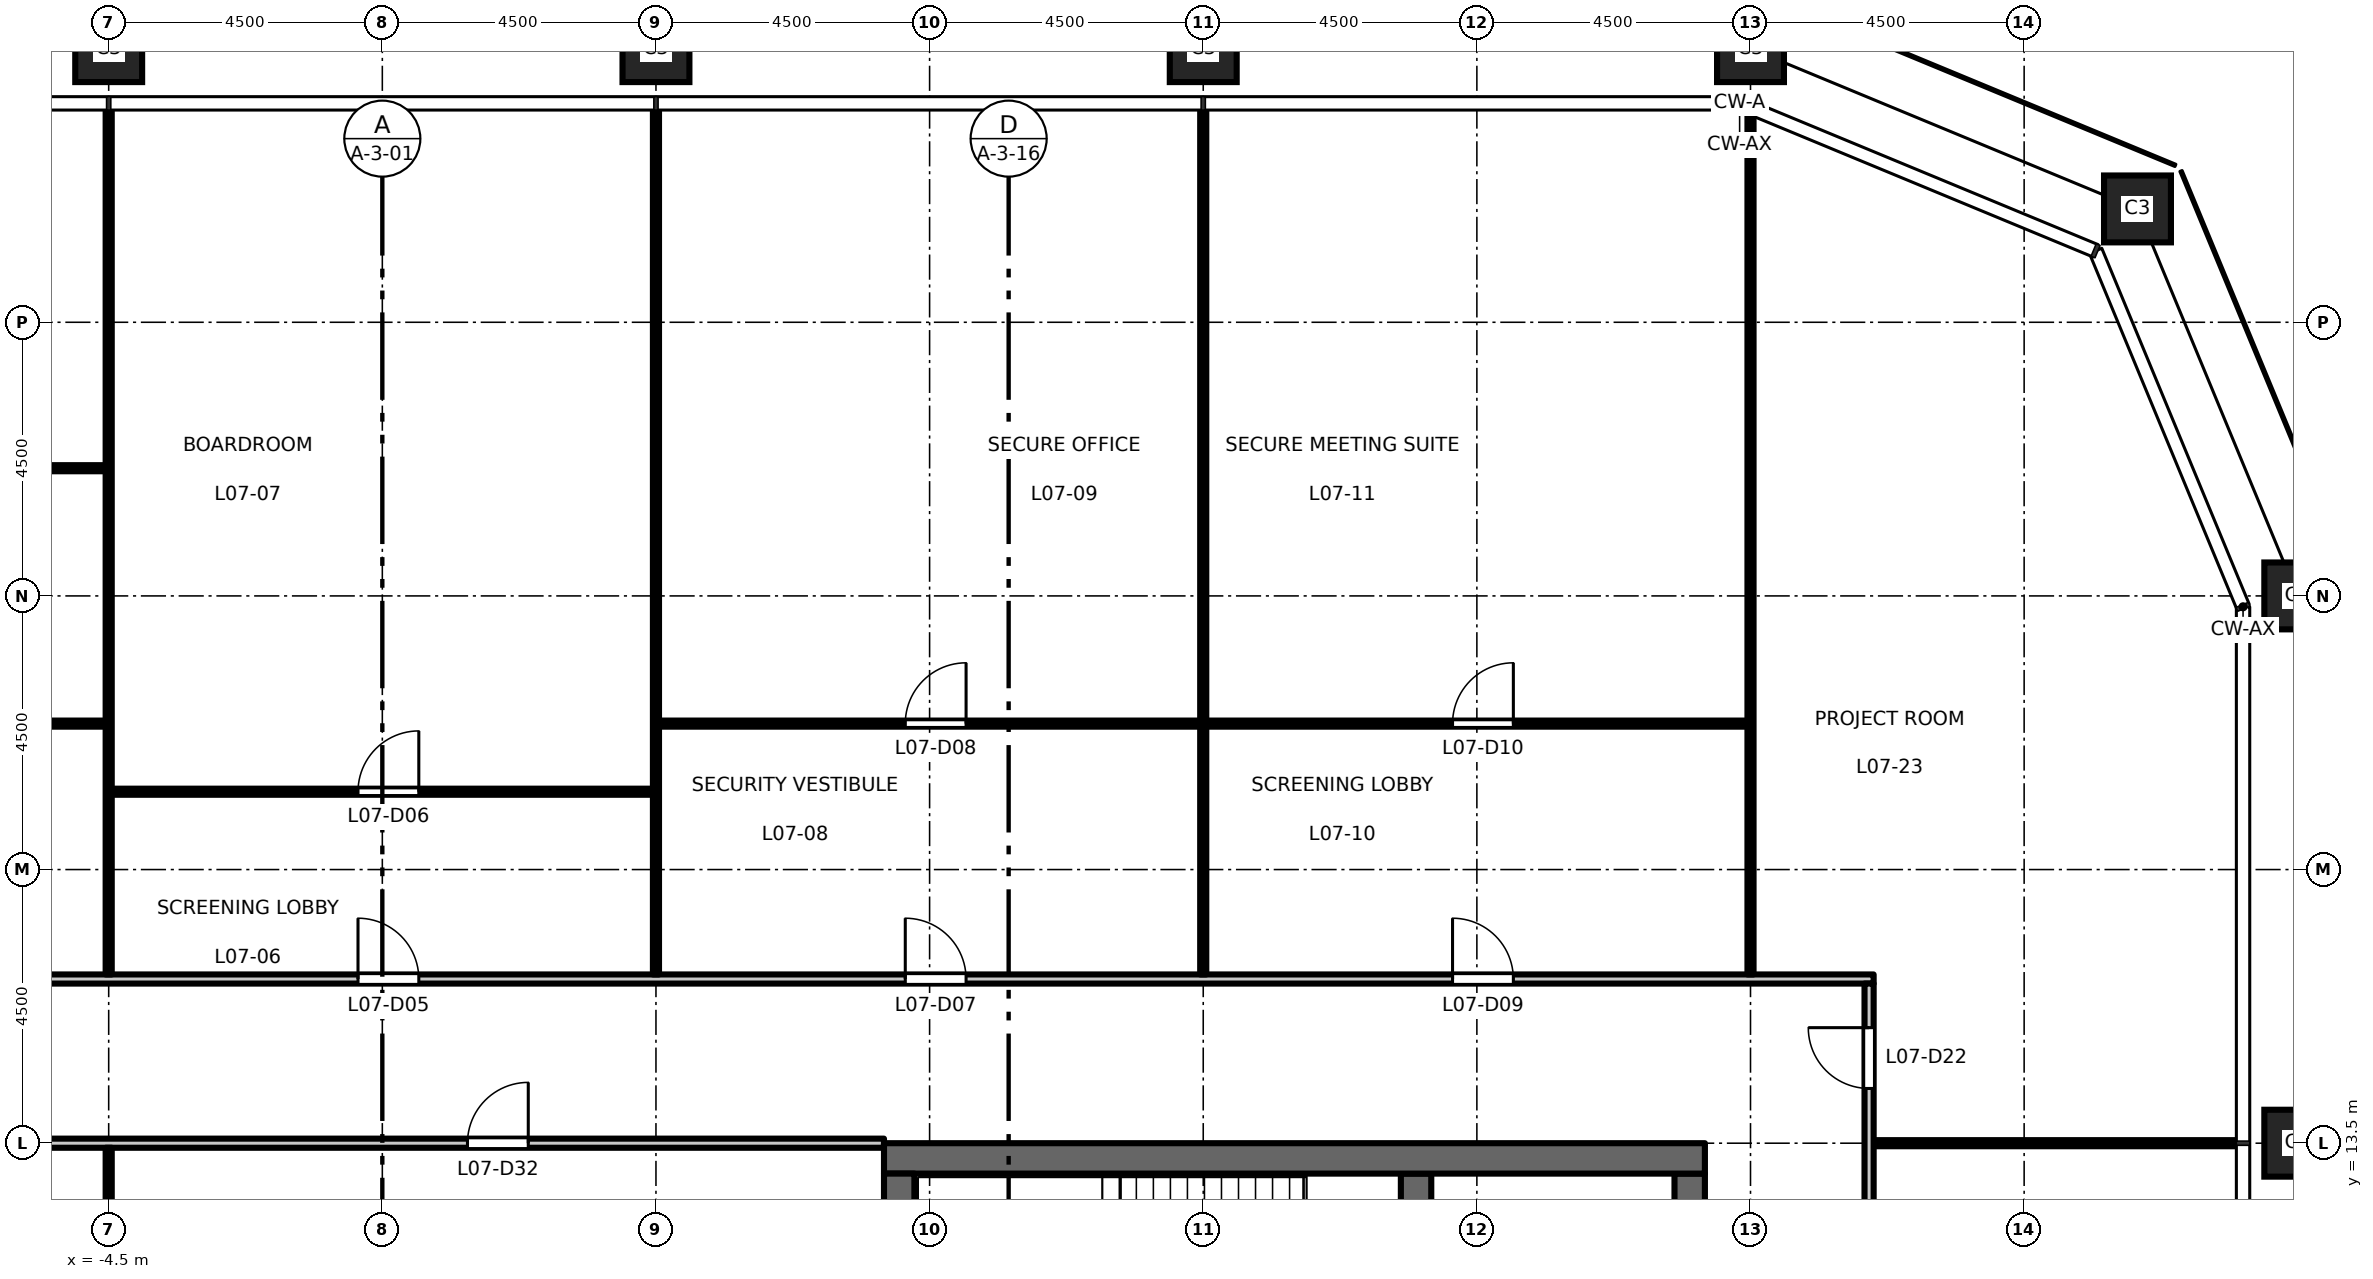
"""IFC4 building model, lengths in metres.
Left out: names, types, materials, properties, quantities, classifications, styles, units other than length and angle.
Written with IfcOpenShell. Run it as: python <this file> out.ifc"""

import sys

from ifc_helpers import new_model, si_unit, direction, frame, frame_2d, origin, origin_2d, place, context, subcontext, project, spatial, rectangle, hollow_rectangle, extrude, element, fill, save


model = new_model("IFC4")
c1 = context("Model", 3, precision=1e-05, world=origin(), true_north=direction((0.0, 1.0)))
c2 = subcontext(c1, "Body", "Model", "MODEL_VIEW")
j1 = project(units=[si_unit("LENGTHUNIT", "METRE"), si_unit("PLANEANGLEUNIT", "RADIAN")], contexts=[c1])
p1 = place(None, origin())
s1 = spatial("IfcSite", under=j1, at=p1, CompositionType="ELEMENT")
p2 = place(p1, origin())
s2 = spatial("IfcBuilding", under=s1, at=p2, CompositionType="ELEMENT")
p3 = place(p2, frame((0.0, 0.0, 35.7)))
s3 = spatial("IfcBuildingStorey", under=s2, at=p3, CompositionType="ELEMENT", Elevation=35.7)
for number, where, z_axis, x_axis in (
    (1, (31.5, 13.5, 0.0), (0.0, 0.0, 1.0), (1.0, 0.0, 0.0)),
    (2, (31.5, 22.5, 0.0), (0.0, 0.0, 1.0), (1.0, 0.0, 0.0)),
    (3, (28.864, 28.864, 0.0), (0.0, 0.0, 1.0), (1.0, 0.0, 0.0)),
    (4, (22.5, 31.5, 0.0), (0.0, 0.0, 1.0), (1.0, 0.0, 0.0)),
    (5, (13.5, 31.5, 0.0), (0.0, 0.0, 1.0), (1.0, 0.0, 0.0)),
    (6, (4.5, 31.5, 0.0), (0.0, 0.0, 1.0), (1.0, 0.0, 0.0)),
    (7, (-4.5, 31.5, 0.0), (0.0, 0.0, 1.0), (1.0, 0.0, 0.0)),
):
    element("IfcColumn", number, at=place(p3, frame(where, z_axis=z_axis, x_axis=x_axis)), inside=s3, PredefinedType="COLUMN", context=c2, shape_type="SweptSolid", body=[
        extrude(hollow_rectangle(XDim=1.1, YDim=1.1, WallThickness=0.07, at=origin_2d()), origin(), (0.0, 0.0, 1.0), 4.5),
    ])
p4 = place(p3, frame((21.5, -13.0, 0.0), z_axis=(0.0, 0.0, 1.0), x_axis=(0.0, 1.0, 0.0)))
e8 = element("IfcWall", 8, at=p4, inside=s3, PredefinedType="SHEAR", context=c2, shape_type="SweptSolid", body=[
    extrude(rectangle(XDim=26.0, YDim=0.5, at=frame_2d((13.0, 0.0))), origin(), (0.0, 0.0, 1.0), 4.35),
])
p5 = place(p4, frame((16.825, 0.0, 0.0)))
e9 = element("IfcOpeningElement", 9, at=p5, cuts=e8, PredefinedType="OPENING", context=c2, shape_type="SweptSolid", body=[
    extrude(rectangle(XDim=1.8, YDim=2.1, at=frame_2d((0.9, 1.05))), frame((0.0, 0.26, 0.0), z_axis=(0.0, -1.0, 0.0), x_axis=(1.0, 0.0, 0.0)), (0.0, 0.0, 1.0), 0.52),
])
p6 = place(p4, frame((7.375, 0.0, 0.0)))
e10 = element("IfcOpeningElement", 10, at=p6, cuts=e8, PredefinedType="OPENING", context=c2, shape_type="SweptSolid", body=[
    extrude(rectangle(XDim=1.8, YDim=2.1, at=frame_2d((0.9, 1.05))), frame((0.0, 0.26, 0.0), z_axis=(0.0, -1.0, 0.0), x_axis=(1.0, 0.0, 0.0)), (0.0, 0.0, 1.0), 0.52),
])
p7 = place(p4, frame((23.4, 0.0, 0.0)))
e11 = element("IfcOpeningElement", 11, at=p7, cuts=e8, PredefinedType="OPENING", context=c2, shape_type="SweptSolid", body=[
    extrude(rectangle(XDim=0.9, YDim=2.1, at=frame_2d((0.45, 1.05))), frame((0.0, 0.26, 0.0), z_axis=(0.0, -1.0, 0.0), x_axis=(1.0, 0.0, 0.0)), (0.0, 0.0, 1.0), 0.52),
])
p8 = place(p3, frame((17.0, 6.425, 0.0), z_axis=(0.0, 0.0, 1.0), x_axis=(0.0, 1.0, 0.0)))
e12 = element("IfcWall", 12, at=p8, inside=s3, PredefinedType="SHEAR", context=c2, shape_type="SweptSolid", body=[
    extrude(rectangle(XDim=6.575, YDim=0.5, at=frame_2d((3.288, 0.0))), origin(), (0.0, 0.0, 1.0), 4.35),
])
p9 = place(p3, frame((8.25, 13.25, 0.0), z_axis=(0.0, 0.0, 1.0), x_axis=(1.0, 0.0, 0.0)))
e13 = element("IfcWall", 13, at=p9, inside=s3, PredefinedType="SHEAR", context=c2, shape_type="SweptSolid", body=[
    extrude(rectangle(XDim=13.5, YDim=0.5, at=frame_2d((6.75, 0.0))), origin(), (0.0, 0.0, 1.0), 4.35),
])
p10 = place(p3, frame((8.5, -13.0, 0.0), z_axis=(0.0, 0.0, 1.0), x_axis=(0.0, 1.0, 0.0)))
e14 = element("IfcWall", 14, at=p10, inside=s3, PredefinedType="SHEAR", context=c2, shape_type="SweptSolid", body=[
    extrude(rectangle(XDim=26.0, YDim=0.5, at=frame_2d((13.0, 0.0))), origin(), (0.0, 0.0, 1.0), 4.35),
])
p11 = place(p3, frame((24.525, 13.5, 0.0), z_axis=(0.0, 0.0, 1.0), x_axis=(1.0, 0.0, 0.0)))
e15 = element("IfcWall", 15, at=p11, inside=s3, PredefinedType="PARTITIONING", context=c2, shape_type="SweptSolid", body=[
    extrude(rectangle(XDim=5.985, YDim=0.1, at=frame_2d((2.993, 0.0))), origin(), (0.0, 0.0, 1.0), 3.35),
])
p12 = place(p3, frame((-8.25, 13.5, 0.0), z_axis=(0.0, 0.0, 1.0), x_axis=(1.0, 0.0, 0.0)))
e16 = element("IfcWall", 16, at=p12, inside=s3, PredefinedType="PARTITIONING", context=c2, shape_type="SweptSolid", body=[
    extrude(rectangle(XDim=16.5, YDim=0.15, at=frame_2d((8.25, 0.0))), origin(), (0.0, 0.0, 1.0), 3.85),
])
p13 = place(p12, frame((1.4, 0.0, 0.0)))
e17 = element("IfcOpeningElement", 17, at=p13, cuts=e16, PredefinedType="OPENING", context=c2, shape_type="SweptSolid", body=[
    extrude(rectangle(XDim=1.0, YDim=2.1, at=frame_2d((0.5, 1.05))), frame((0.0, 0.085, 0.0), z_axis=(0.0, -1.0, 0.0), x_axis=(1.0, 0.0, 0.0)), (0.0, 0.0, 1.0), 0.17),
])
p14 = place(p12, frame((9.65, 0.0, 0.0)))
e18 = element("IfcOpeningElement", 18, at=p14, cuts=e16, PredefinedType="OPENING", context=c2, shape_type="SweptSolid", body=[
    extrude(rectangle(XDim=1.0, YDim=2.1, at=frame_2d((0.5, 1.05))), frame((0.0, 0.085, 0.0), z_axis=(0.0, -1.0, 0.0), x_axis=(1.0, 0.0, 0.0)), (0.0, 0.0, 1.0), 0.17),
])
p15 = place(p3, frame((-24.525, 16.2, 0.0), z_axis=(0.0, 0.0, 1.0), x_axis=(1.0, 0.0, 0.0)))
e19 = element("IfcWall", 19, at=p15, inside=s3, PredefinedType="PARTITIONING", context=c2, shape_type="SweptSolid", body=[
    extrude(rectangle(XDim=49.05, YDim=0.15, at=frame_2d((24.525, 0.0))), origin(), (0.0, 0.0, 1.0), 4.35),
])
p16 = place(p15, frame((6.125, 0.0, 0.0)))
e20 = element("IfcOpeningElement", 20, at=p16, cuts=e19, PredefinedType="OPENING", context=c2, shape_type="SweptSolid", body=[
    extrude(rectangle(XDim=1.0, YDim=2.1, at=frame_2d((0.5, 1.05))), frame((0.0, 0.085, 0.0), z_axis=(0.0, -1.0, 0.0), x_axis=(1.0, 0.0, 0.0)), (0.0, 0.0, 1.0), 0.17),
])
p17 = place(p15, frame((15.125, 0.0, 0.0)))
e21 = element("IfcOpeningElement", 21, at=p17, cuts=e19, PredefinedType="OPENING", context=c2, shape_type="SweptSolid", body=[
    extrude(rectangle(XDim=1.0, YDim=2.1, at=frame_2d((0.5, 1.05))), frame((0.0, 0.085, 0.0), z_axis=(0.0, -1.0, 0.0), x_axis=(1.0, 0.0, 0.0)), (0.0, 0.0, 1.0), 0.17),
])
p18 = place(p15, frame((24.125, 0.0, 0.0)))
e22 = element("IfcOpeningElement", 22, at=p18, cuts=e19, PredefinedType="OPENING", context=c2, shape_type="SweptSolid", body=[
    extrude(rectangle(XDim=1.0, YDim=2.1, at=frame_2d((0.5, 1.05))), frame((0.0, 0.085, 0.0), z_axis=(0.0, -1.0, 0.0), x_axis=(1.0, 0.0, 0.0)), (0.0, 0.0, 1.0), 0.17),
])
p19 = place(p15, frame((33.125, 0.0, 0.0)))
e23 = element("IfcOpeningElement", 23, at=p19, cuts=e19, PredefinedType="OPENING", context=c2, shape_type="SweptSolid", body=[
    extrude(rectangle(XDim=1.0, YDim=2.1, at=frame_2d((0.5, 1.05))), frame((0.0, 0.085, 0.0), z_axis=(0.0, -1.0, 0.0), x_axis=(1.0, 0.0, 0.0)), (0.0, 0.0, 1.0), 0.17),
])
p20 = place(p15, frame((42.125, 0.0, 0.0)))
e24 = element("IfcOpeningElement", 24, at=p20, cuts=e19, PredefinedType="OPENING", context=c2, shape_type="SweptSolid", body=[
    extrude(rectangle(XDim=1.0, YDim=2.1, at=frame_2d((0.5, 1.05))), frame((0.0, 0.085, 0.0), z_axis=(0.0, -1.0, 0.0), x_axis=(1.0, 0.0, 0.0)), (0.0, 0.0, 1.0), 0.17),
])
p21 = place(p3, frame((-4.45, 19.28, 0.0), z_axis=(0.0, 0.0, 1.0), x_axis=(1.0, 0.0, 0.0)))
e25 = element("IfcWall", 25, at=p21, inside=s3, PredefinedType="PARTITIONING", context=c2, shape_type="SweptSolid", body=[
    extrude(rectangle(XDim=8.9, YDim=0.1, at=frame_2d((4.45, 0.0))), origin(), (0.0, 0.0, 1.0), 4.35),
])
p22 = place(p21, frame((4.05, 0.0, 0.0)))
e26 = element("IfcOpeningElement", 26, at=p22, cuts=e25, PredefinedType="OPENING", context=c2, shape_type="SweptSolid", body=[
    extrude(rectangle(XDim=1.0, YDim=2.1, at=frame_2d((0.5, 1.05))), frame((0.0, 0.06, 0.0), z_axis=(0.0, -1.0, 0.0), x_axis=(1.0, 0.0, 0.0)), (0.0, 0.0, 1.0), 0.12),
])
p23 = place(p3, frame((-13.45, 20.4, 0.0), z_axis=(0.0, 0.0, 1.0), x_axis=(1.0, 0.0, 0.0)))
e27 = element("IfcWall", 27, at=p23, inside=s3, PredefinedType="PARTITIONING", context=c2, shape_type="SweptSolid", body=[
    extrude(rectangle(XDim=8.9, YDim=0.1, at=frame_2d((4.45, 0.0))), origin(), (0.0, 0.0, 1.0), 4.35),
])
p24 = place(p23, frame((4.05, 0.0, 0.0)))
e28 = element("IfcOpeningElement", 28, at=p24, cuts=e27, PredefinedType="OPENING", context=c2, shape_type="SweptSolid", body=[
    extrude(rectangle(XDim=1.0, YDim=2.1, at=frame_2d((0.5, 1.05))), frame((0.0, 0.06, 0.0), z_axis=(0.0, -1.0, 0.0), x_axis=(1.0, 0.0, 0.0)), (0.0, 0.0, 1.0), 0.12),
])
p25 = place(p3, frame((4.55, 20.4, 0.0), z_axis=(0.0, 0.0, 1.0), x_axis=(1.0, 0.0, 0.0)))
e29 = element("IfcWall", 29, at=p25, inside=s3, PredefinedType="PARTITIONING", context=c2, shape_type="SweptSolid", body=[
    extrude(rectangle(XDim=17.9, YDim=0.1, at=frame_2d((8.95, 0.0))), origin(), (0.0, 0.0, 1.0), 4.35),
])
p26 = place(p25, frame((4.05, 0.0, 0.0)))
e30 = element("IfcOpeningElement", 30, at=p26, cuts=e29, PredefinedType="OPENING", context=c2, shape_type="SweptSolid", body=[
    extrude(rectangle(XDim=1.0, YDim=2.1, at=frame_2d((0.5, 1.05))), frame((0.0, 0.06, 0.0), z_axis=(0.0, -1.0, 0.0), x_axis=(1.0, 0.0, 0.0)), (0.0, 0.0, 1.0), 0.12),
])
p27 = place(p25, frame((13.05, 0.0, 0.0)))
e31 = element("IfcOpeningElement", 31, at=p27, cuts=e29, PredefinedType="OPENING", context=c2, shape_type="SweptSolid", body=[
    extrude(rectangle(XDim=1.0, YDim=2.1, at=frame_2d((0.5, 1.05))), frame((0.0, 0.06, 0.0), z_axis=(0.0, -1.0, 0.0), x_axis=(1.0, 0.0, 0.0)), (0.0, 0.0, 1.0), 0.12),
])
p28 = place(p3, frame((-13.45, 24.6, 0.0), z_axis=(0.0, 0.0, 1.0), x_axis=(1.0, 0.0, 0.0)))
e32 = element("IfcWall", 32, at=p28, inside=s3, PredefinedType="PARTITIONING", context=c2, shape_type="SweptSolid", body=[
    extrude(rectangle(XDim=8.9, YDim=0.1, at=frame_2d((4.45, 0.0))), origin(), (0.0, 0.0, 1.0), 4.35),
])
p29 = place(p28, frame((4.05, 0.0, 0.0)))
e33 = element("IfcOpeningElement", 33, at=p29, cuts=e32, PredefinedType="OPENING", context=c2, shape_type="SweptSolid", body=[
    extrude(rectangle(XDim=1.0, YDim=2.1, at=frame_2d((0.5, 1.05))), frame((0.0, 0.06, 0.0), z_axis=(0.0, -1.0, 0.0), x_axis=(1.0, 0.0, 0.0)), (0.0, 0.0, 1.0), 0.12),
])
p30 = place(p3, frame((-4.5, 8.37, 0.0), z_axis=(0.0, 0.0, 1.0), x_axis=(0.0, 1.0, 0.0)))
e34 = element("IfcWall", 34, at=p30, inside=s3, PredefinedType="PARTITIONING", context=c2, shape_type="SweptSolid", body=[
    extrude(rectangle(XDim=5.055, YDim=0.1, at=frame_2d((2.527, 0.0))), origin(), (0.0, 0.0, 1.0), 3.35),
])
for number, where, z_axis, x_axis in (
    (35, (-4.5, 16.275, 0.0), (0.0, 0.0, 1.0), (0.0, 1.0, 0.0)),
    (36, (4.5, 16.275, 0.0), (0.0, 0.0, 1.0), (0.0, 1.0, 0.0)),
):
    element("IfcWall", number, at=place(p3, frame(where, z_axis=z_axis, x_axis=x_axis)), inside=s3, PredefinedType="PARTITIONING", context=c2, shape_type="SweptSolid", body=[
        extrude(rectangle(XDim=14.235, YDim=0.1, at=frame_2d((7.118, 0.0))), origin(), (0.0, 0.0, 1.0), 3.35),
    ])
p31 = place(p3, frame((13.5, 16.275, 0.0), z_axis=(0.0, 0.0, 1.0), x_axis=(0.0, 1.0, 0.0)))
e37 = element("IfcWall", 37, at=p31, inside=s3, PredefinedType="PARTITIONING", context=c2, shape_type="SweptSolid", body=[
    extrude(rectangle(XDim=4.075, YDim=0.1, at=frame_2d((2.038, 0.0))), origin(), (0.0, 0.0, 1.0), 3.35),
])
p32 = place(p3, frame((13.5, 20.45, 0.0), z_axis=(0.0, 0.0, 1.0), x_axis=(0.0, 1.0, 0.0)))
e38 = element("IfcWall", 38, at=p32, inside=s3, PredefinedType="PARTITIONING", context=c2, shape_type="SweptSolid", body=[
    extrude(rectangle(XDim=10.06, YDim=0.1, at=frame_2d((5.03, 0.0))), origin(), (0.0, 0.0, 1.0), 3.35),
])
p33 = place(p3, frame((22.5, 16.275, 0.0), z_axis=(0.0, 0.0, 1.0), x_axis=(0.0, 1.0, 0.0)))
e39 = element("IfcWall", 39, at=p33, inside=s3, PredefinedType="PARTITIONING", context=c2, shape_type="SweptSolid", body=[
    extrude(rectangle(XDim=14.153, YDim=0.1, at=frame_2d((7.077, 0.0))), origin(), (0.0, 0.0, 1.0), 3.35),
])
p34 = place(p3, frame((24.45, -16.125, 0.0), z_axis=(0.0, 0.0, 1.0), x_axis=(0.0, 1.0, 0.0)))
e40 = element("IfcWall", 40, at=p34, inside=s3, PredefinedType="PARTITIONING", context=c2, shape_type="SweptSolid", body=[
    extrude(rectangle(XDim=32.25, YDim=0.15, at=frame_2d((16.125, 0.0))), origin(), (0.0, 0.0, 1.0), 4.35),
])
p35 = place(p34, frame((30.525, 0.0, 0.0)))
e41 = element("IfcOpeningElement", 41, at=p35, cuts=e40, PredefinedType="OPENING", context=c2, shape_type="SweptSolid", body=[
    extrude(rectangle(XDim=1.0, YDim=2.1, at=frame_2d((0.5, 1.05))), frame((0.0, 0.085, 0.0), z_axis=(0.0, -1.0, 0.0), x_axis=(1.0, 0.0, 0.0)), (0.0, 0.0, 1.0), 0.17),
])
p36 = place(p34, frame((0.825, 0.0, 0.0)))
e42 = element("IfcOpeningElement", 42, at=p36, cuts=e40, PredefinedType="OPENING", context=c2, shape_type="SweptSolid", body=[
    extrude(rectangle(XDim=1.0, YDim=2.1, at=frame_2d((0.5, 1.05))), frame((0.0, 0.085, 0.0), z_axis=(0.0, -1.0, 0.0), x_axis=(1.0, 0.0, 0.0)), (0.0, 0.0, 1.0), 0.17),
])
p37 = place(p34, frame((6.525, 0.0, 0.0)))
e43 = element("IfcOpeningElement", 43, at=p37, cuts=e40, PredefinedType="OPENING", context=c2, shape_type="SweptSolid", body=[
    extrude(rectangle(XDim=1.0, YDim=2.1, at=frame_2d((0.5, 1.05))), frame((0.0, 0.085, 0.0), z_axis=(0.0, -1.0, 0.0), x_axis=(1.0, 0.0, 0.0)), (0.0, 0.0, 1.0), 0.17),
])
p38 = place(p34, frame((15.525, 0.0, 0.0)))
e44 = element("IfcOpeningElement", 44, at=p38, cuts=e40, PredefinedType="OPENING", context=c2, shape_type="SweptSolid", body=[
    extrude(rectangle(XDim=1.0, YDim=2.1, at=frame_2d((0.5, 1.05))), frame((0.0, 0.085, 0.0), z_axis=(0.0, -1.0, 0.0), x_axis=(1.0, 0.0, 0.0)), (0.0, 0.0, 1.0), 0.17),
])
p39 = place(p34, frame((24.525, 0.0, 0.0)))
e45 = element("IfcOpeningElement", 45, at=p39, cuts=e40, PredefinedType="OPENING", context=c2, shape_type="SweptSolid", body=[
    extrude(rectangle(XDim=1.0, YDim=2.1, at=frame_2d((0.5, 1.05))), frame((0.0, 0.085, 0.0), z_axis=(0.0, -1.0, 0.0), x_axis=(1.0, 0.0, 0.0)), (0.0, 0.0, 1.0), 0.17),
])
p40 = place(p18, origin())
e46 = element("IfcDoor", 46, at=p40, inside=s3, OperationType="SINGLE_SWING_LEFT", PredefinedType="DOOR", context=c2, shape_type="SweptSolid", body=[
    extrude(rectangle(XDim=1.0, YDim=2.1, at=frame_2d((0.5, 1.05))), frame((0.0, 0.025, 0.0), z_axis=(0.0, -1.0, 0.0), x_axis=(1.0, 0.0, 0.0)), (0.0, 0.0, 1.0), 0.05),
])
fill(e22, e46)
p41 = place(p22, origin())
e47 = element("IfcDoor", 47, at=p41, inside=s3, OperationType="SINGLE_SWING_RIGHT", PredefinedType="DOOR", context=c2, shape_type="SweptSolid", body=[
    extrude(rectangle(XDim=1.0, YDim=2.1, at=frame_2d((0.5, 1.05))), frame((0.0, 0.025, 0.0), z_axis=(0.0, -1.0, 0.0), x_axis=(1.0, 0.0, 0.0)), (0.0, 0.0, 1.0), 0.05),
])
fill(e26, e47)
p42 = place(p19, origin())
e48 = element("IfcDoor", 48, at=p42, inside=s3, OperationType="SINGLE_SWING_LEFT", PredefinedType="DOOR", context=c2, shape_type="SweptSolid", body=[
    extrude(rectangle(XDim=1.0, YDim=2.1, at=frame_2d((0.5, 1.05))), frame((0.0, 0.025, 0.0), z_axis=(0.0, -1.0, 0.0), x_axis=(1.0, 0.0, 0.0)), (0.0, 0.0, 1.0), 0.05),
])
fill(e23, e48)
p43 = place(p26, origin())
e49 = element("IfcDoor", 49, at=p43, inside=s3, OperationType="SINGLE_SWING_RIGHT", PredefinedType="DOOR", context=c2, shape_type="SweptSolid", body=[
    extrude(rectangle(XDim=1.0, YDim=2.1, at=frame_2d((0.5, 1.05))), frame((0.0, 0.025, 0.0), z_axis=(0.0, -1.0, 0.0), x_axis=(1.0, 0.0, 0.0)), (0.0, 0.0, 1.0), 0.05),
])
fill(e30, e49)
p44 = place(p20, origin())
e50 = element("IfcDoor", 50, at=p44, inside=s3, OperationType="SINGLE_SWING_LEFT", PredefinedType="DOOR", context=c2, shape_type="SweptSolid", body=[
    extrude(rectangle(XDim=1.0, YDim=2.1, at=frame_2d((0.5, 1.05))), frame((0.0, 0.025, 0.0), z_axis=(0.0, -1.0, 0.0), x_axis=(1.0, 0.0, 0.0)), (0.0, 0.0, 1.0), 0.05),
])
fill(e24, e50)
p45 = place(p27, origin())
e51 = element("IfcDoor", 51, at=p45, inside=s3, OperationType="SINGLE_SWING_RIGHT", PredefinedType="DOOR", context=c2, shape_type="SweptSolid", body=[
    extrude(rectangle(XDim=1.0, YDim=2.1, at=frame_2d((0.5, 1.05))), frame((0.0, 0.025, 0.0), z_axis=(0.0, -1.0, 0.0), x_axis=(1.0, 0.0, 0.0)), (0.0, 0.0, 1.0), 0.05),
])
fill(e31, e51)
p46 = place(p35, origin())
e52 = element("IfcDoor", 52, at=p46, inside=s3, OperationType="SINGLE_SWING_RIGHT", PredefinedType="DOOR", context=c2, shape_type="SweptSolid", body=[
    extrude(rectangle(XDim=1.0, YDim=2.1, at=frame_2d((0.5, 1.05))), frame((0.0, 0.025, 0.0), z_axis=(0.0, -1.0, 0.0), x_axis=(1.0, 0.0, 0.0)), (0.0, 0.0, 1.0), 0.05),
])
fill(e41, e52)
p47 = place(p14, origin())
e53 = element("IfcDoor", 53, at=p47, inside=s3, OperationType="SINGLE_SWING_RIGHT", PredefinedType="DOOR", context=c2, shape_type="SweptSolid", body=[
    extrude(rectangle(XDim=1.0, YDim=2.1, at=frame_2d((0.5, 1.05))), frame((0.0, 0.025, 0.0), z_axis=(0.0, -1.0, 0.0), x_axis=(1.0, 0.0, 0.0)), (0.0, 0.0, 1.0), 0.05),
])
fill(e18, e53)
save(model, sys.argv[1])
